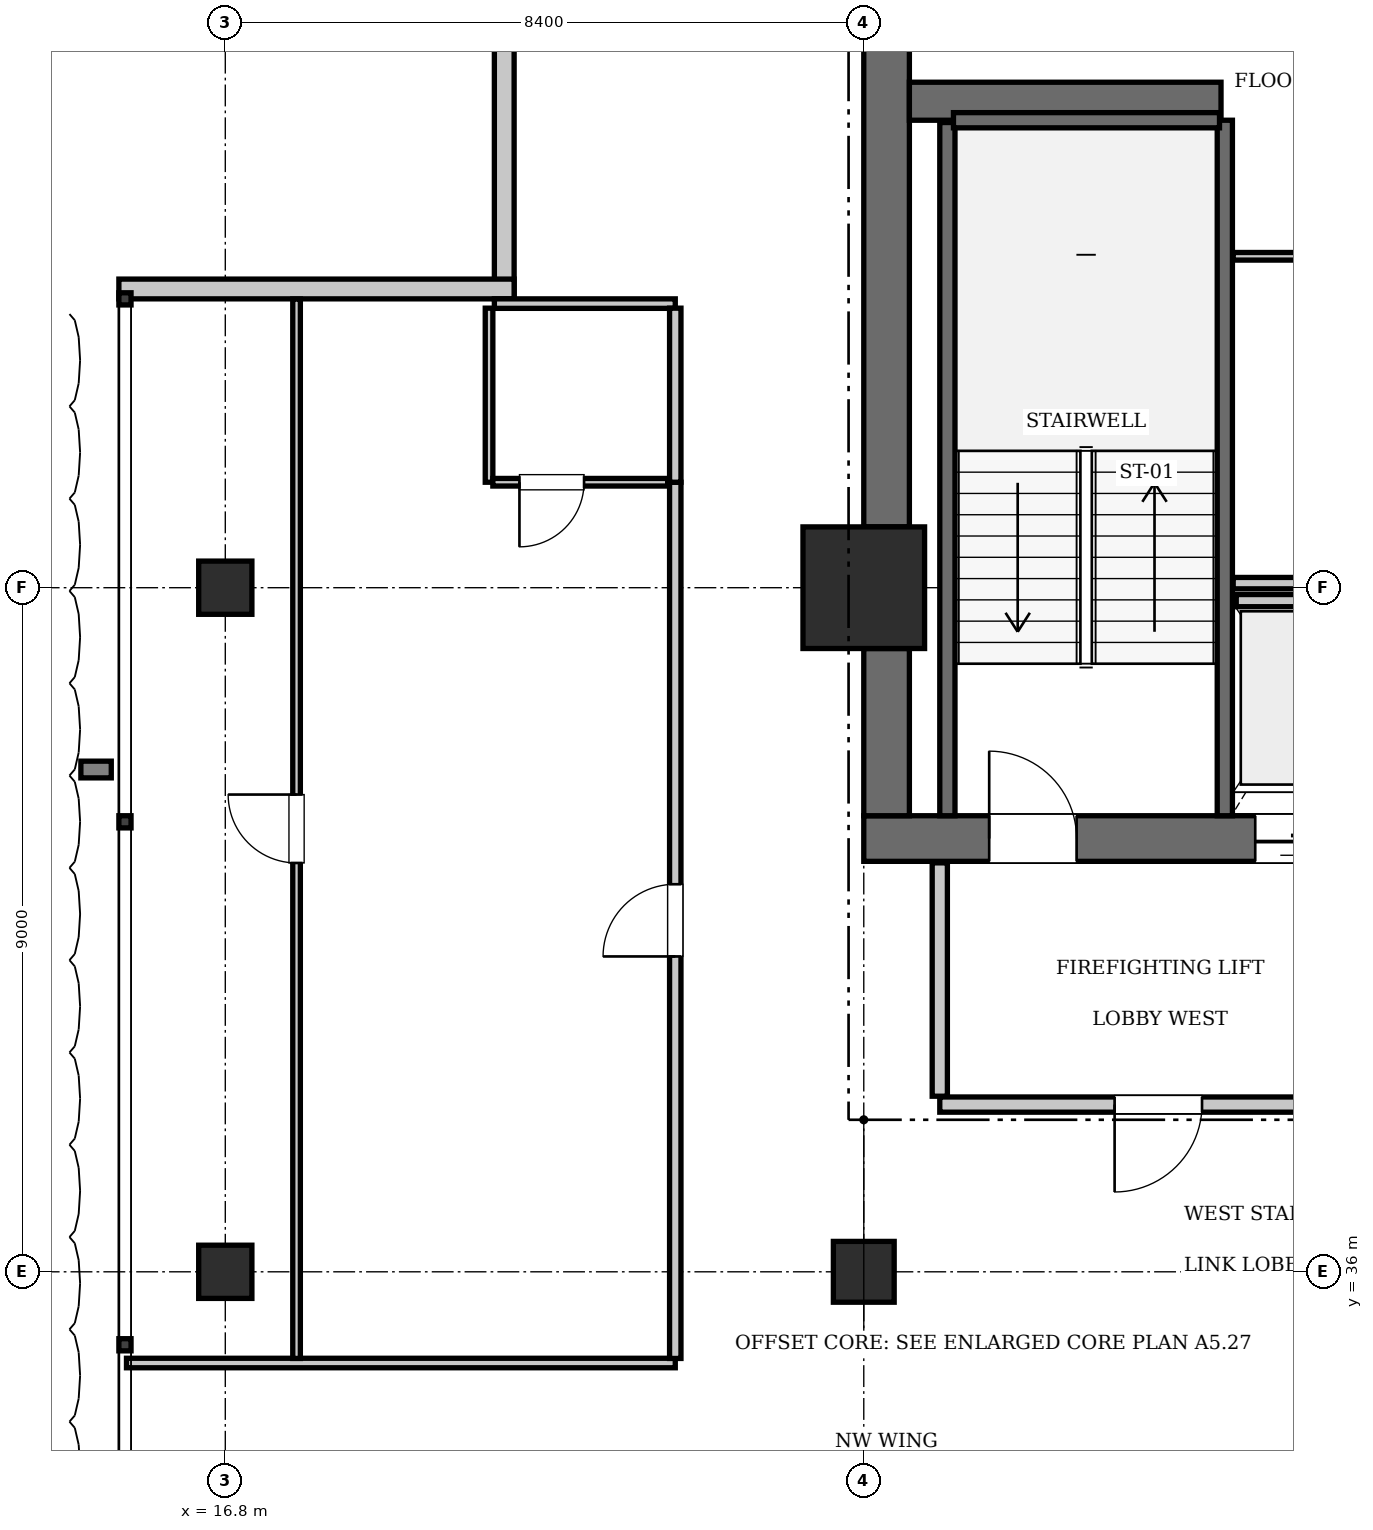
"""IFC4 building model, lengths in metres.
Left out: names, types, materials, properties, quantities, classifications, styles, units other than length and angle.
Written with IfcOpenShell. Run it as: python <this file> out.ifc"""

import sys

from ifc_helpers import new_model, si_unit, direction, frame, frame_2d, origin, origin_2d, place, context, subcontext, project, spatial, rectangle, extrude, element, fill, save


model = new_model("IFC4")
c1 = context("Model", 3, precision=1e-05, world=origin(), true_north=direction((0.0, 1.0)))
c2 = subcontext(c1, "Body", "Model", "MODEL_VIEW")
j1 = project(units=[si_unit("LENGTHUNIT", "METRE"), si_unit("PLANEANGLEUNIT", "RADIAN")], contexts=[c1])
p1 = place(None, origin())
s1 = spatial("IfcSite", under=j1, at=p1, CompositionType="ELEMENT")
p2 = place(p1, origin())
s2 = spatial("IfcBuilding", under=s1, at=p2, CompositionType="ELEMENT")
p3 = place(p2, frame((0.0, 0.0, 312.55)))
s3 = spatial("IfcBuildingStorey", under=s2, at=p3, CompositionType="ELEMENT", Elevation=312.55)
p4 = place(p3, frame((25.2, 45.0, 0.0), z_axis=(0.0, 0.0, 1.0), x_axis=(1.0, 0.0, 0.0)))
e1 = element("IfcColumn", 1, at=p4, inside=s3, PredefinedType="COLUMN", context=c2, shape_type="SweptSolid", body=[
    extrude(rectangle(XDim=1.6, YDim=1.6, at=origin_2d()), origin(), (0.0, 0.0, 1.0), 3.85),
])
p5 = place(p3, frame((25.2, 41.7, 0.0), z_axis=(0.0, 0.0, 1.0), x_axis=(1.0, 0.0, 0.0)))
e2 = element("IfcWall", 2, at=p5, inside=s3, PredefinedType="SHEAR", context=c2, shape_type="SweptSolid", body=[
    extrude(rectangle(XDim=6.8, YDim=0.6, at=frame_2d((3.4, 0.0))), origin(), (0.0, 0.0, 1.0), 3.85),
])
p6 = place(p5, frame((1.65, 0.0, 0.0)))
e3 = element("IfcOpeningElement", 3, at=p6, cuts=e2, PredefinedType="OPENING", context=c2, shape_type="SweptSolid", body=[
    extrude(rectangle(XDim=1.15, YDim=2.15, at=frame_2d((0.575, 1.075))), frame((0.0, 0.31, 0.0), z_axis=(0.0, -1.0, 0.0), x_axis=(1.0, 0.0, 0.0)), (0.0, 0.0, 1.0), 0.62),
])
p7 = place(p5, frame((5.15, 0.0, 0.0)))
e4 = element("IfcOpeningElement", 4, at=p7, cuts=e2, PredefinedType="OPENING", context=c2, shape_type="SweptSolid", body=[
    extrude(rectangle(XDim=1.1, YDim=2.2, at=frame_2d((0.55, 1.1))), frame((0.0, 0.31, 0.0), z_axis=(0.0, -1.0, 0.0), x_axis=(1.0, 0.0, 0.0)), (0.0, 0.0, 1.0), 0.62),
])
p8 = place(p3, frame((25.5, 42.0, 0.0), z_axis=(0.0, 0.0, 1.0), x_axis=(0.0, 1.0, 0.0)))
e5 = element("IfcWall", 5, at=p8, inside=s3, PredefinedType="SHEAR", context=c2, shape_type="SweptSolid", body=[
    extrude(rectangle(XDim=2.2, YDim=0.6, at=frame_2d((1.1, 0.0))), origin(), (0.0, 0.0, 1.0), 3.85),
])
p9 = place(p3, frame((25.5, 45.8, 0.0), z_axis=(0.0, 0.0, 1.0), x_axis=(0.0, 1.0, 0.0)))
e6 = element("IfcWall", 6, at=p9, inside=s3, PredefinedType="SHEAR", context=c2, shape_type="SweptSolid", body=[
    extrude(rectangle(XDim=7.6, YDim=0.6, at=frame_2d((3.8, 0.0))), origin(), (0.0, 0.0, 1.0), 3.85),
])
p10 = place(p3, frame((25.8, 51.4, 0.0), z_axis=(0.0, 0.0, 1.0), x_axis=(1.0, 0.0, 0.0)))
e7 = element("IfcWall", 7, at=p10, inside=s3, PredefinedType="SHEAR", context=c2, shape_type="SweptSolid", body=[
    extrude(rectangle(XDim=4.1, YDim=0.5, at=frame_2d((2.05, 0.0))), origin(), (0.0, 0.0, 1.0), 3.85),
])
p11 = place(p3, frame((25.2, 36.0, 0.0), z_axis=(0.0, 0.0, 1.0), x_axis=(1.0, 0.0, 0.0)))
e8 = element("IfcColumn", 8, at=p11, inside=s3, PredefinedType="COLUMN", context=c2, shape_type="SweptSolid", body=[
    extrude(rectangle(XDim=0.8, YDim=0.8, at=origin_2d()), origin(), (0.0, 0.0, 1.0), 3.85),
])
for number, where, z_axis, x_axis in (
    (9, (16.8, 36.0, 0.0), (0.0, 0.0, 1.0), (1.0, 0.0, 0.0)),
    (10, (16.8, 45.0, 0.0), (0.0, 0.0, 1.0), (1.0, 0.0, 0.0)),
):
    element("IfcColumn", number, at=place(p3, frame(where, z_axis=z_axis, x_axis=x_axis)), inside=s3, PredefinedType="COLUMN", context=c2, shape_type="SweptSolid", body=[
        extrude(rectangle(XDim=0.7, YDim=0.7, at=origin_2d()), origin(), (0.0, 0.0, 1.0), 3.85),
    ])
p12 = place(p3, frame((29.95, 42.0, 0.0), z_axis=(0.0, 0.0, 1.0), x_axis=(0.0, 1.0, 0.0)))
e11 = element("IfcWall", 11, at=p12, inside=s3, PredefinedType="SOLIDWALL", context=c2, shape_type="SweptSolid", body=[
    extrude(rectangle(XDim=9.15, YDim=0.2, at=frame_2d((4.575, 0.0))), origin(), (0.0, 0.0, 1.0), 3.55),
])
p13 = place(p3, frame((26.3, 42.0, 0.0), z_axis=(0.0, 0.0, 1.0), x_axis=(0.0, 1.0, 0.0)))
e12 = element("IfcWall", 12, at=p13, inside=s3, PredefinedType="SOLIDWALL", context=c2, shape_type="SweptSolid", body=[
    extrude(rectangle(XDim=9.12, YDim=0.2, at=frame_2d((4.56, 0.0))), origin(), (0.0, 0.0, 1.0), 3.55),
])
p14 = place(p3, frame((26.38, 51.15, 0.0), z_axis=(0.0, 0.0, 1.0), x_axis=(1.0, 0.0, 0.0)))
e13 = element("IfcWall", 13, at=p14, inside=s3, PredefinedType="SOLIDWALL", context=c2, shape_type="SweptSolid", body=[
    extrude(rectangle(XDim=3.5, YDim=0.2, at=frame_2d((1.75, 0.0))), origin(), (0.0, 0.0, 1.0), 3.55),
])
p15 = place(p3, frame((30.1, 44.83, 0.0), z_axis=(0.0, 0.0, 1.0), x_axis=(1.0, 0.0, 0.0)))
e14 = element("IfcWall", 14, at=p15, inside=s3, PredefinedType="SOLIDWALL", context=c2, shape_type="SweptSolid", body=[
    extrude(rectangle(XDim=1.6, YDim=0.16, at=frame_2d((0.8, 0.0))), origin(), (0.0, 0.0, 1.0), 3.55),
])
p16 = place(p3, frame((20.47, 48.8, 0.0), z_axis=(0.0, 0.0, 1.0), x_axis=(0.0, 1.0, 0.0)))
e15 = element("IfcWall", 15, at=p16, inside=s3, PredefinedType="SOLIDWALL", context=c2, shape_type="SweptSolid", body=[
    extrude(rectangle(XDim=5.2, YDim=0.26, at=frame_2d((2.6, 0.0))), origin(), (0.0, 0.0, 1.0), 3.55),
])
p17 = place(p3, frame((15.4, 48.93, 0.0), z_axis=(0.0, 0.0, 1.0), x_axis=(1.0, 0.0, 0.0)))
e16 = element("IfcWall", 16, at=p17, inside=s3, PredefinedType="SOLIDWALL", context=c2, shape_type="SweptSolid", body=[
    extrude(rectangle(XDim=5.2, YDim=0.26, at=frame_2d((2.6, 0.0))), origin(), (0.0, 0.0, 1.0), 3.55),
])
p18 = place(p3, frame((26.2, 38.2, 0.0), z_axis=(0.0, 0.0, 1.0), x_axis=(1.0, 0.0, 0.0)))
e17 = element("IfcWall", 17, at=p18, inside=s3, PredefinedType="PARTITIONING", context=c2, shape_type="SweptSolid", body=[
    extrude(rectangle(XDim=5.8, YDim=0.2, at=frame_2d((2.9, 0.0))), origin(), (0.0, 0.0, 1.0), 3.55),
])
p19 = place(p18, frame((2.3, 0.0, 0.0)))
e18 = element("IfcOpeningElement", 18, at=p19, cuts=e17, PredefinedType="OPENING", context=c2, shape_type="SweptSolid", body=[
    extrude(rectangle(XDim=1.15, YDim=2.15, at=frame_2d((0.575, 1.075))), frame((0.0, 0.11, 0.0), z_axis=(0.0, -1.0, 0.0), x_axis=(1.0, 0.0, 0.0)), (0.0, 0.0, 1.0), 0.22),
])
p20 = place(p3, frame((26.2, 38.31, 0.0), z_axis=(0.0, 0.0, 1.0), x_axis=(0.0, 1.0, 0.0)))
e19 = element("IfcWall", 19, at=p20, inside=s3, PredefinedType="PARTITIONING", context=c2, shape_type="SweptSolid", body=[
    extrude(rectangle(XDim=3.07, YDim=0.2, at=frame_2d((1.535, 0.0))), origin(), (0.0, 0.0, 1.0), 3.55),
])
p21 = place(p3, frame((30.06, 45.06, 0.0), z_axis=(0.0, 0.0, 1.0), x_axis=(1.0, 0.0, 0.0)))
e20 = element("IfcWall", 20, at=p21, inside=s3, PredefinedType="PARTITIONING", context=c2, shape_type="SweptSolid", body=[
    extrude(rectangle(XDim=3.18, YDim=0.15, at=frame_2d((1.59, 0.0))), origin(), (0.0, 0.0, 1.0), 3.55),
])
p22 = place(p3, frame((30.06, 49.36, 0.0), z_axis=(0.0, 0.0, 1.0), x_axis=(1.0, 0.0, 0.0)))
e21 = element("IfcWall", 21, at=p22, inside=s3, PredefinedType="PARTITIONING", context=c2, shape_type="SweptSolid", body=[
    extrude(rectangle(XDim=3.18, YDim=0.1, at=frame_2d((1.59, 0.0))), origin(), (0.0, 0.0, 1.0), 3.55),
])
p23 = place(p22, frame((1.95, 0.0, 0.0)))
e22 = element("IfcOpeningElement", 22, at=p23, cuts=e21, PredefinedType="OPENING", context=c2, shape_type="SweptSolid", body=[
    extrude(rectangle(XDim=0.8, YDim=2.05, at=frame_2d((0.4, 1.025))), frame((0.0, 0.06, 0.0), z_axis=(0.0, -1.0, 0.0), x_axis=(1.0, 0.0, 0.0)), (0.0, 0.0, 1.0), 0.12),
])
p24 = place(p3, frame((15.5, 34.8, 0.0), z_axis=(0.0, 0.0, 1.0), x_axis=(1.0, 0.0, 0.0)))
e23 = element("IfcWall", 23, at=p24, inside=s3, PredefinedType="PARTITIONING", context=c2, shape_type="SweptSolid", body=[
    extrude(rectangle(XDim=7.22, YDim=0.125, at=frame_2d((3.61, 0.0))), origin(), (0.0, 0.0, 1.0), 3.55),
])
p25 = place(p3, frame((20.34, 48.738, 0.0), z_axis=(0.0, 0.0, 1.0), x_axis=(1.0, 0.0, 0.0)))
e24 = element("IfcWall", 24, at=p25, inside=s3, PredefinedType="PARTITIONING", context=c2, shape_type="SweptSolid", body=[
    extrude(rectangle(XDim=2.38, YDim=0.125, at=frame_2d((1.19, 0.0))), origin(), (0.0, 0.0, 1.0), 3.55),
])
p26 = place(p3, frame((22.72, 34.86, 0.0), z_axis=(0.0, 0.0, 1.0), x_axis=(0.0, 1.0, 0.0)))
e25 = element("IfcWall", 25, at=p26, inside=s3, PredefinedType="PARTITIONING", context=c2, shape_type="SweptSolid", body=[
    extrude(rectangle(XDim=11.527, YDim=0.15, at=frame_2d((5.764, 0.0))), origin(), (0.0, 0.0, 1.0), 3.55),
])
p27 = place(p26, frame((5.289, 0.0, 0.0)))
e26 = element("IfcOpeningElement", 26, at=p27, cuts=e25, PredefinedType="OPENING", context=c2, shape_type="SweptSolid", body=[
    extrude(rectangle(XDim=0.95, YDim=2.15, at=frame_2d((0.475, 1.075))), frame((0.0, 0.085, 0.0), z_axis=(0.0, -1.0, 0.0), x_axis=(1.0, 0.0, 0.0)), (0.0, 0.0, 1.0), 0.17),
])
p28 = place(p3, frame((22.72, 46.387, 0.0), z_axis=(0.0, 0.0, 1.0), x_axis=(0.0, 1.0, 0.0)))
e27 = element("IfcWall", 27, at=p28, inside=s3, PredefinedType="PARTITIONING", context=c2, shape_type="SweptSolid", body=[
    extrude(rectangle(XDim=2.29, YDim=0.15, at=frame_2d((1.145, 0.0))), origin(), (0.0, 0.0, 1.0), 3.55),
])
p29 = place(p3, frame((20.27, 46.387, 0.0), z_axis=(0.0, 0.0, 1.0), x_axis=(0.0, 1.0, 0.0)))
e28 = element("IfcWall", 28, at=p29, inside=s3, PredefinedType="PARTITIONING", context=c2, shape_type="SweptSolid", body=[
    extrude(rectangle(XDim=2.29, YDim=0.1, at=frame_2d((1.145, 0.0))), origin(), (0.0, 0.0, 1.0), 3.55),
])
p30 = place(p3, frame((20.32, 46.387, 0.0), z_axis=(0.0, 0.0, 1.0), x_axis=(1.0, 0.0, 0.0)))
e29 = element("IfcWall", 29, at=p30, inside=s3, PredefinedType="PARTITIONING", context=c2, shape_type="SweptSolid", body=[
    extrude(rectangle(XDim=2.3, YDim=0.1, at=frame_2d((1.15, 0.0))), origin(), (0.0, 0.0, 1.0), 3.55),
])
p31 = place(p30, frame((0.35, 0.0, 0.0)))
e30 = element("IfcOpeningElement", 30, at=p31, cuts=e29, PredefinedType="OPENING", context=c2, shape_type="SweptSolid", body=[
    extrude(rectangle(XDim=0.85, YDim=2.1, at=frame_2d((0.425, 1.05))), frame((0.0, 0.06, 0.0), z_axis=(0.0, -1.0, 0.0), x_axis=(1.0, 0.0, 0.0)), (0.0, 0.0, 1.0), 0.12),
])
p32 = place(p3, frame((17.738, 34.86, 0.0), z_axis=(0.0, 0.0, 1.0), x_axis=(0.0, 1.0, 0.0)))
e31 = element("IfcWall", 31, at=p32, inside=s3, PredefinedType="PARTITIONING", context=c2, shape_type="SweptSolid", body=[
    extrude(rectangle(XDim=13.938, YDim=0.1, at=frame_2d((6.969, 0.0))), origin(), (0.0, 0.0, 1.0), 3.55),
])
p33 = place(p32, frame((6.519, 0.0, 0.0)))
e32 = element("IfcOpeningElement", 32, at=p33, cuts=e31, PredefinedType="OPENING", context=c2, shape_type="SweptSolid", body=[
    extrude(rectangle(XDim=0.9, YDim=2.1, at=frame_2d((0.45, 1.05))), frame((0.0, 0.06, 0.0), z_axis=(0.0, -1.0, 0.0), x_axis=(1.0, 0.0, 0.0)), (0.0, 0.0, 1.0), 0.12),
])
p34 = place(p6, origin())
e33 = element("IfcDoor", 33, at=p34, inside=s3, OperationType="SINGLE_SWING_LEFT", PredefinedType="DOOR", context=c2, shape_type="SweptSolid", body=[
    extrude(rectangle(XDim=1.15, YDim=2.15, at=frame_2d((0.575, 1.075))), frame((0.0, 0.025, 0.0), z_axis=(0.0, -1.0, 0.0), x_axis=(1.0, 0.0, 0.0)), (0.0, 0.0, 1.0), 0.05),
])
fill(e3, e33)
p35 = place(p7, frame((1.1, 0.0, 0.0), z_axis=(0.0, 0.0, 1.0), x_axis=(-1.0, 0.0, 0.0)))
e34 = element("IfcDoor", 34, at=p35, inside=s3, OperationType="SLIDING_TO_LEFT", PredefinedType="DOOR", context=c2, shape_type="SweptSolid", body=[
    extrude(rectangle(XDim=1.1, YDim=2.2, at=frame_2d((0.55, 1.1))), frame((0.0, 0.025, 0.0), z_axis=(0.0, -1.0, 0.0), x_axis=(1.0, 0.0, 0.0)), (0.0, 0.0, 1.0), 0.05),
])
fill(e4, e34)
p36 = place(p19, frame((1.15, 0.0, 0.0), z_axis=(0.0, 0.0, 1.0), x_axis=(-1.0, 0.0, 0.0)))
e35 = element("IfcDoor", 35, at=p36, inside=s3, OperationType="SINGLE_SWING_RIGHT", PredefinedType="DOOR", context=c2, shape_type="SweptSolid", body=[
    extrude(rectangle(XDim=1.15, YDim=2.15, at=frame_2d((0.575, 1.075))), frame((0.0, 0.025, 0.0), z_axis=(0.0, -1.0, 0.0), x_axis=(1.0, 0.0, 0.0)), (0.0, 0.0, 1.0), 0.05),
])
fill(e18, e35)
p37 = place(p31, frame((0.85, 0.0, 0.0), z_axis=(0.0, 0.0, 1.0), x_axis=(-1.0, 0.0, 0.0)))
e36 = element("IfcDoor", 36, at=p37, inside=s3, OperationType="SINGLE_SWING_RIGHT", PredefinedType="DOOR", context=c2, shape_type="SweptSolid", body=[
    extrude(rectangle(XDim=0.85, YDim=2.1, at=frame_2d((0.425, 1.05))), frame((0.0, 0.025, 0.0), z_axis=(0.0, -1.0, 0.0), x_axis=(1.0, 0.0, 0.0)), (0.0, 0.0, 1.0), 0.05),
])
fill(e30, e36)
p38 = place(p27, origin())
e37 = element("IfcDoor", 37, at=p38, inside=s3, OperationType="SINGLE_SWING_LEFT", PredefinedType="DOOR", context=c2, shape_type="SweptSolid", body=[
    extrude(rectangle(XDim=0.95, YDim=2.15, at=frame_2d((0.475, 1.075))), frame((0.0, 0.025, 0.0), z_axis=(0.0, -1.0, 0.0), x_axis=(1.0, 0.0, 0.0)), (0.0, 0.0, 1.0), 0.05),
])
fill(e26, e37)
p39 = place(p33, origin())
e38 = element("IfcDoor", 38, at=p39, inside=s3, OperationType="SINGLE_SWING_RIGHT", PredefinedType="DOOR", context=c2, shape_type="SweptSolid", body=[
    extrude(rectangle(XDim=0.9, YDim=2.1, at=frame_2d((0.45, 1.05))), frame((0.0, 0.025, 0.0), z_axis=(0.0, -1.0, 0.0), x_axis=(1.0, 0.0, 0.0)), (0.0, 0.0, 1.0), 0.05),
])
fill(e32, e38)
save(model, sys.argv[1])
